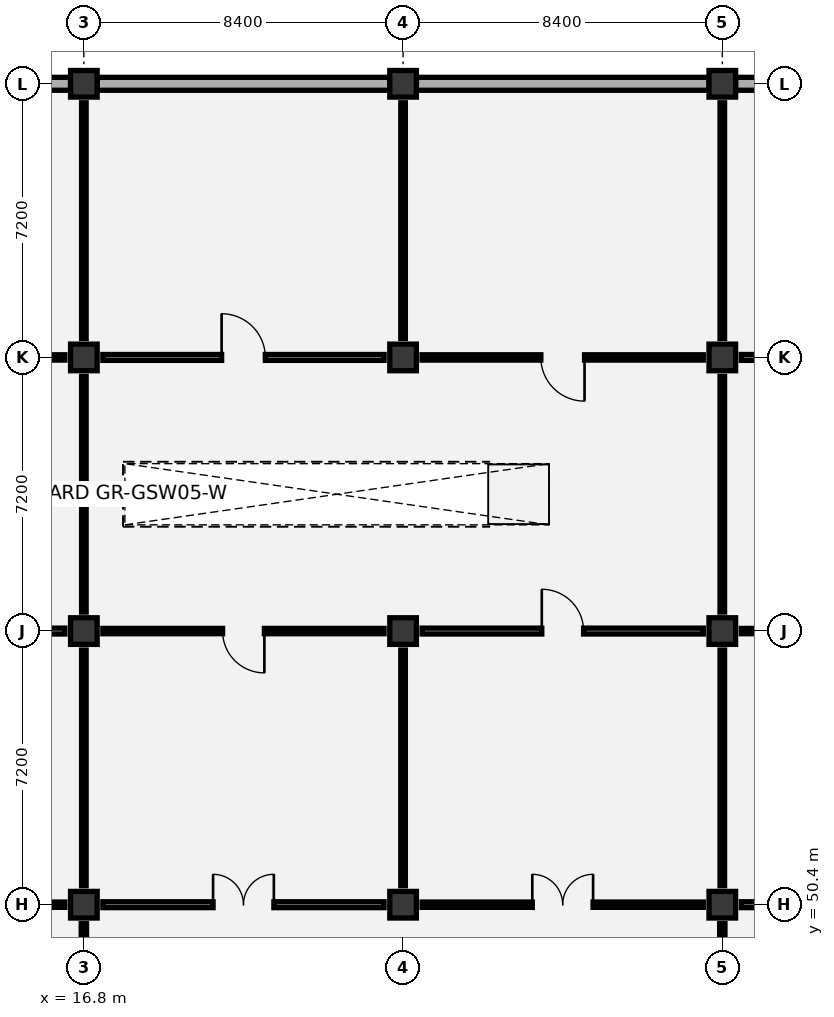
"""IFC4 building model, lengths in metres.
Left out: names, types, materials, properties, quantities, classifications, styles, units other than length and angle.
Written with IfcOpenShell. Run it as: python <this file> out.ifc"""

import sys

from ifc_helpers import new_model, si_unit, direction, frame, frame_2d, origin, origin_2d, place, context, subcontext, project, spatial, rectangle, extrude, element, fill, save


model = new_model("IFC4")
c1 = context("Model", 3, precision=1e-05, world=origin(), true_north=direction((0.0, 1.0)))
c2 = subcontext(c1, "Body", "Model", "MODEL_VIEW")
j1 = project(units=[si_unit("LENGTHUNIT", "METRE"), si_unit("PLANEANGLEUNIT", "RADIAN")], contexts=[c1])
p1 = place(None, origin())
s1 = spatial("IfcSite", under=j1, at=p1, CompositionType="ELEMENT")
p2 = place(p1, origin())
s2 = spatial("IfcBuilding", under=s1, at=p2, CompositionType="ELEMENT")
p3 = place(p2, origin())
s3 = spatial("IfcBuildingStorey", under=s2, at=p3, CompositionType="ELEMENT", Elevation=0.0)
for number, where, z_axis, x_axis in (
    (1, (16.8, 50.4, 0.0), (0.0, 0.0, 1.0), (1.0, 0.0, 0.0)),
    (2, (16.8, 57.6, 0.0), (0.0, 0.0, 1.0), (1.0, 0.0, 0.0)),
    (3, (16.8, 64.8, 0.0), (0.0, 0.0, 1.0), (1.0, 0.0, 0.0)),
    (4, (16.8, 72.0, 0.0), (0.0, 0.0, 1.0), (1.0, 0.0, 0.0)),
    (5, (25.2, 50.4, 0.0), (0.0, 0.0, 1.0), (1.0, 0.0, 0.0)),
    (6, (25.2, 57.6, 0.0), (0.0, 0.0, 1.0), (1.0, 0.0, 0.0)),
    (7, (25.2, 64.8, 0.0), (0.0, 0.0, 1.0), (1.0, 0.0, 0.0)),
    (8, (25.2, 72.0, 0.0), (0.0, 0.0, 1.0), (1.0, 0.0, 0.0)),
    (9, (33.6, 50.4, 0.0), (0.0, 0.0, 1.0), (1.0, 0.0, 0.0)),
    (10, (33.6, 57.6, 0.0), (0.0, 0.0, 1.0), (1.0, 0.0, 0.0)),
    (11, (33.6, 64.8, 0.0), (0.0, 0.0, 1.0), (1.0, 0.0, 0.0)),
    (12, (33.6, 72.0, 0.0), (0.0, 0.0, 1.0), (1.0, 0.0, 0.0)),
):
    element("IfcColumn", number, at=place(p3, frame(where, z_axis=z_axis, x_axis=x_axis)), inside=s3, PredefinedType="COLUMN", context=c2, shape_type="SweptSolid", body=[
        extrude(rectangle(XDim=0.7, YDim=0.7, at=origin_2d()), origin(), (0.0, 0.0, 1.0), 6.0),
    ])
p4 = place(p3, frame((8.75, 72.0, 0.0), z_axis=(0.0, 0.0, 1.0), x_axis=(1.0, 0.0, 0.0)))
e13 = element("IfcWall", 13, at=p4, inside=s3, PredefinedType="SOLIDWALL", context=c2, shape_type="SweptSolid", body=[
    extrude(rectangle(XDim=7.7, YDim=0.34, at=frame_2d((3.85, 0.0))), origin(), (0.0, 0.0, 1.0), 5.02),
])
p5 = place(p3, frame((17.15, 72.0, 0.0), z_axis=(0.0, 0.0, 1.0), x_axis=(1.0, 0.0, 0.0)))
e14 = element("IfcWall", 14, at=p5, inside=s3, PredefinedType="SOLIDWALL", context=c2, shape_type="SweptSolid", body=[
    extrude(rectangle(XDim=7.7, YDim=0.34, at=frame_2d((3.85, 0.0))), origin(), (0.0, 0.0, 1.0), 5.02),
])
for number, where, z_axis, x_axis in (
    (15, (25.55, 72.0, 0.0), (0.0, 0.0, 1.0), (1.0, 0.0, 0.0)),
    (16, (33.95, 72.0, 0.0), (0.0, 0.0, 1.0), (1.0, 0.0, 0.0)),
):
    element("IfcWall", number, at=place(p3, frame(where, z_axis=z_axis, x_axis=x_axis)), inside=s3, PredefinedType="SOLIDWALL", context=c2, shape_type="SweptSolid", body=[
        extrude(rectangle(XDim=7.7, YDim=0.34, at=frame_2d((3.85, 0.0))), origin(), (0.0, 0.0, 1.0), 5.02),
    ])
p6 = place(p3, frame((16.8, 43.7, 0.0), z_axis=(0.0, 0.0, 1.0), x_axis=(0.0, 1.0, 0.0)))
e17 = element("IfcWall", 17, at=p6, inside=s3, PredefinedType="PARTITIONING", context=c2, shape_type="SweptSolid", body=[
    extrude(rectangle(XDim=6.2, YDim=0.14, at=frame_2d((3.1, 0.0))), origin(), (0.0, 0.0, 1.0), 5.38),
])
p7 = place(p6, frame((2.3, 0.0, 0.0)))
e18 = element("IfcOpeningElement", 18, at=p7, cuts=e17, PredefinedType="OPENING", context=c2, shape_type="SweptSolid", body=[
    extrude(rectangle(XDim=1.6, YDim=2.2, at=frame_2d((0.8, 1.1))), frame((0.0, 0.08, 0.0), z_axis=(0.0, -1.0, 0.0), x_axis=(1.0, 0.0, 0.0)), (0.0, 0.0, 1.0), 0.16),
])
p8 = place(p3, frame((8.9, 50.4, 0.0), z_axis=(0.0, 0.0, 1.0), x_axis=(1.0, 0.0, 0.0)))
e19 = element("IfcWall", 19, at=p8, inside=s3, PredefinedType="PARTITIONING", context=c2, shape_type="SweptSolid", body=[
    extrude(rectangle(XDim=7.4, YDim=0.14, at=frame_2d((3.7, 0.0))), origin(), (0.0, 0.0, 1.0), 4.87),
])
p9 = place(p8, frame((2.8, 0.0, 0.0)))
e20 = element("IfcOpeningElement", 20, at=p9, cuts=e19, PredefinedType="OPENING", context=c2, shape_type="SweptSolid", body=[
    extrude(rectangle(XDim=1.8, YDim=2.25, at=frame_2d((0.9, 1.125))), frame((0.0, 0.08, 0.0), z_axis=(0.0, -1.0, 0.0), x_axis=(1.0, 0.0, 0.0)), (0.0, 0.0, 1.0), 0.16),
])
p10 = place(p3, frame((16.8, 50.9, 0.0), z_axis=(0.0, 0.0, 1.0), x_axis=(0.0, 1.0, 0.0)))
e21 = element("IfcWall", 21, at=p10, inside=s3, PredefinedType="PARTITIONING", context=c2, shape_type="SweptSolid", body=[
    extrude(rectangle(XDim=6.2, YDim=0.12, at=frame_2d((3.1, 0.0))), origin(), (0.0, 0.0, 1.0), 4.92),
])
p11 = place(p3, frame((8.9, 57.6, 0.0), z_axis=(0.0, 0.0, 1.0), x_axis=(1.0, 0.0, 0.0)))
e22 = element("IfcWall", 22, at=p11, inside=s3, PredefinedType="PARTITIONING", context=c2, shape_type="SweptSolid", body=[
    extrude(rectangle(XDim=7.4, YDim=0.155, at=frame_2d((3.7, 0.0))), origin(), (0.0, 0.0, 1.0), 4.87),
])
p12 = place(p11, frame((3.125, 0.0, 0.0)))
e23 = element("IfcOpeningElement", 23, at=p12, cuts=e22, PredefinedType="OPENING", context=c2, shape_type="SweptSolid", body=[
    extrude(rectangle(XDim=1.15, YDim=2.1, at=frame_2d((0.575, 1.05))), frame((0.0, 0.087, 0.0), z_axis=(0.0, -1.0, 0.0), x_axis=(1.0, 0.0, 0.0)), (0.0, 0.0, 1.0), 0.175),
])
p13 = place(p3, frame((16.8, 58.1, 0.0), z_axis=(0.0, 0.0, 1.0), x_axis=(0.0, 1.0, 0.0)))
e24 = element("IfcWall", 24, at=p13, inside=s3, PredefinedType="PARTITIONING", context=c2, shape_type="SweptSolid", body=[
    extrude(rectangle(XDim=6.2, YDim=0.12, at=frame_2d((3.1, 0.0))), origin(), (0.0, 0.0, 1.0), 5.17),
])
p14 = place(p3, frame((8.9, 64.8, 0.0), z_axis=(0.0, 0.0, 1.0), x_axis=(1.0, 0.0, 0.0)))
e25 = element("IfcWall", 25, at=p14, inside=s3, PredefinedType="PARTITIONING", context=c2, shape_type="SweptSolid", body=[
    extrude(rectangle(XDim=7.4, YDim=0.14, at=frame_2d((3.7, 0.0))), origin(), (0.0, 0.0, 1.0), 4.87),
])
p15 = place(p14, frame((3.15, 0.0, 0.0)))
e26 = element("IfcOpeningElement", 26, at=p15, cuts=e25, PredefinedType="OPENING", context=c2, shape_type="SweptSolid", body=[
    extrude(rectangle(XDim=1.1, YDim=2.1, at=frame_2d((0.55, 1.05))), frame((0.0, 0.08, 0.0), z_axis=(0.0, -1.0, 0.0), x_axis=(1.0, 0.0, 0.0)), (0.0, 0.0, 1.0), 0.16),
])
p16 = place(p3, frame((16.8, 65.3, 0.0), z_axis=(0.0, 0.0, 1.0), x_axis=(0.0, 1.0, 0.0)))
e27 = element("IfcWall", 27, at=p16, inside=s3, PredefinedType="PARTITIONING", context=c2, shape_type="SweptSolid", body=[
    extrude(rectangle(XDim=6.2, YDim=0.12, at=frame_2d((3.1, 0.0))), origin(), (0.0, 0.0, 1.0), 4.92),
])
p17 = place(p3, frame((17.3, 50.4, 0.0), z_axis=(0.0, 0.0, 1.0), x_axis=(1.0, 0.0, 0.0)))
e28 = element("IfcWall", 28, at=p17, inside=s3, PredefinedType="PARTITIONING", context=c2, shape_type="SweptSolid", body=[
    extrude(rectangle(XDim=7.4, YDim=0.155, at=frame_2d((3.7, 0.0))), origin(), (0.0, 0.0, 1.0), 4.87),
])
p18 = place(p17, frame((2.9, 0.0, 0.0)))
e29 = element("IfcOpeningElement", 29, at=p18, cuts=e28, PredefinedType="OPENING", context=c2, shape_type="SweptSolid", body=[
    extrude(rectangle(XDim=1.6, YDim=2.2, at=frame_2d((0.8, 1.1))), frame((0.0, 0.087, 0.0), z_axis=(0.0, -1.0, 0.0), x_axis=(1.0, 0.0, 0.0)), (0.0, 0.0, 1.0), 0.175),
])
p19 = place(p3, frame((25.2, 50.9, 0.0), z_axis=(0.0, 0.0, 1.0), x_axis=(0.0, 1.0, 0.0)))
e30 = element("IfcWall", 30, at=p19, inside=s3, PredefinedType="PARTITIONING", context=c2, shape_type="SweptSolid", body=[
    extrude(rectangle(XDim=6.2, YDim=0.12, at=frame_2d((3.1, 0.0))), origin(), (0.0, 0.0, 1.0), 5.17),
])
p20 = place(p3, frame((17.3, 57.6, 0.0), z_axis=(0.0, 0.0, 1.0), x_axis=(1.0, 0.0, 0.0)))
e31 = element("IfcWall", 31, at=p20, inside=s3, PredefinedType="PARTITIONING", context=c2, shape_type="SweptSolid", body=[
    extrude(rectangle(XDim=7.4, YDim=0.14, at=frame_2d((3.7, 0.0))), origin(), (0.0, 0.0, 1.0), 4.87),
])
p21 = place(p20, frame((3.15, 0.0, 0.0)))
e32 = element("IfcOpeningElement", 32, at=p21, cuts=e31, PredefinedType="OPENING", context=c2, shape_type="SweptSolid", body=[
    extrude(rectangle(XDim=1.1, YDim=2.1, at=frame_2d((0.55, 1.05))), frame((0.0, 0.08, 0.0), z_axis=(0.0, -1.0, 0.0), x_axis=(1.0, 0.0, 0.0)), (0.0, 0.0, 1.0), 0.16),
])
p22 = place(p3, frame((17.3, 64.8, 0.0), z_axis=(0.0, 0.0, 1.0), x_axis=(1.0, 0.0, 0.0)))
e33 = element("IfcWall", 33, at=p22, inside=s3, PredefinedType="PARTITIONING", context=c2, shape_type="SweptSolid", body=[
    extrude(rectangle(XDim=7.4, YDim=0.155, at=frame_2d((3.7, 0.0))), origin(), (0.0, 0.0, 1.0), 4.87),
])
p23 = place(p22, frame((3.125, 0.0, 0.0)))
e34 = element("IfcOpeningElement", 34, at=p23, cuts=e33, PredefinedType="OPENING", context=c2, shape_type="SweptSolid", body=[
    extrude(rectangle(XDim=1.15, YDim=2.1, at=frame_2d((0.575, 1.05))), frame((0.0, 0.087, 0.0), z_axis=(0.0, -1.0, 0.0), x_axis=(1.0, 0.0, 0.0)), (0.0, 0.0, 1.0), 0.175),
])
p24 = place(p3, frame((25.2, 65.3, 0.0), z_axis=(0.0, 0.0, 1.0), x_axis=(0.0, 1.0, 0.0)))
e35 = element("IfcWall", 35, at=p24, inside=s3, PredefinedType="PARTITIONING", context=c2, shape_type="SweptSolid", body=[
    extrude(rectangle(XDim=6.2, YDim=0.12, at=frame_2d((3.1, 0.0))), origin(), (0.0, 0.0, 1.0), 5.27),
])
p25 = place(p3, frame((33.6, 43.7, 0.0), z_axis=(0.0, 0.0, 1.0), x_axis=(0.0, 1.0, 0.0)))
e36 = element("IfcWall", 36, at=p25, inside=s3, PredefinedType="PARTITIONING", context=c2, shape_type="SweptSolid", body=[
    extrude(rectangle(XDim=6.2, YDim=0.14, at=frame_2d((3.1, 0.0))), origin(), (0.0, 0.0, 1.0), 5.17),
])
p26 = place(p25, frame((2.2, 0.0, 0.0)))
e37 = element("IfcOpeningElement", 37, at=p26, cuts=e36, PredefinedType="OPENING", context=c2, shape_type="SweptSolid", body=[
    extrude(rectangle(XDim=1.8, YDim=2.25, at=frame_2d((0.9, 1.125))), frame((0.0, 0.08, 0.0), z_axis=(0.0, -1.0, 0.0), x_axis=(1.0, 0.0, 0.0)), (0.0, 0.0, 1.0), 0.16),
])
p27 = place(p3, frame((25.7, 50.4, 0.0), z_axis=(0.0, 0.0, 1.0), x_axis=(1.0, 0.0, 0.0)))
e38 = element("IfcWall", 38, at=p27, inside=s3, PredefinedType="PARTITIONING", context=c2, shape_type="SweptSolid", body=[
    extrude(rectangle(XDim=7.4, YDim=0.14, at=frame_2d((3.7, 0.0))), origin(), (0.0, 0.0, 1.0), 4.87),
])
p28 = place(p27, frame((2.9, 0.0, 0.0)))
e39 = element("IfcOpeningElement", 39, at=p28, cuts=e38, PredefinedType="OPENING", context=c2, shape_type="SweptSolid", body=[
    extrude(rectangle(XDim=1.6, YDim=2.2, at=frame_2d((0.8, 1.1))), frame((0.0, 0.08, 0.0), z_axis=(0.0, -1.0, 0.0), x_axis=(1.0, 0.0, 0.0)), (0.0, 0.0, 1.0), 0.16),
])
p29 = place(p3, frame((33.6, 50.9, 0.0), z_axis=(0.0, 0.0, 1.0), x_axis=(0.0, 1.0, 0.0)))
e40 = element("IfcWall", 40, at=p29, inside=s3, PredefinedType="PARTITIONING", context=c2, shape_type="SweptSolid", body=[
    extrude(rectangle(XDim=6.2, YDim=0.12, at=frame_2d((3.1, 0.0))), origin(), (0.0, 0.0, 1.0), 4.92),
])
p30 = place(p3, frame((25.7, 57.6, 0.0), z_axis=(0.0, 0.0, 1.0), x_axis=(1.0, 0.0, 0.0)))
e41 = element("IfcWall", 41, at=p30, inside=s3, PredefinedType="PARTITIONING", context=c2, shape_type="SweptSolid", body=[
    extrude(rectangle(XDim=7.4, YDim=0.155, at=frame_2d((3.7, 0.0))), origin(), (0.0, 0.0, 1.0), 4.87),
])
p31 = place(p30, frame((3.15, 0.0, 0.0)))
e42 = element("IfcOpeningElement", 42, at=p31, cuts=e41, PredefinedType="OPENING", context=c2, shape_type="SweptSolid", body=[
    extrude(rectangle(XDim=1.1, YDim=2.1, at=frame_2d((0.55, 1.05))), frame((0.0, 0.087, 0.0), z_axis=(0.0, -1.0, 0.0), x_axis=(1.0, 0.0, 0.0)), (0.0, 0.0, 1.0), 0.175),
])
p32 = place(p3, frame((33.6, 58.1, 0.0), z_axis=(0.0, 0.0, 1.0), x_axis=(0.0, 1.0, 0.0)))
e43 = element("IfcWall", 43, at=p32, inside=s3, PredefinedType="PARTITIONING", context=c2, shape_type="SweptSolid", body=[
    extrude(rectangle(XDim=6.2, YDim=0.12, at=frame_2d((3.1, 0.0))), origin(), (0.0, 0.0, 1.0), 5.27),
])
p33 = place(p3, frame((25.7, 64.8, 0.0), z_axis=(0.0, 0.0, 1.0), x_axis=(1.0, 0.0, 0.0)))
e44 = element("IfcWall", 44, at=p33, inside=s3, PredefinedType="PARTITIONING", context=c2, shape_type="SweptSolid", body=[
    extrude(rectangle(XDim=7.4, YDim=0.14, at=frame_2d((3.7, 0.0))), origin(), (0.0, 0.0, 1.0), 4.87),
])
p34 = place(p33, frame((3.125, 0.0, 0.0)))
e45 = element("IfcOpeningElement", 45, at=p34, cuts=e44, PredefinedType="OPENING", context=c2, shape_type="SweptSolid", body=[
    extrude(rectangle(XDim=1.15, YDim=2.1, at=frame_2d((0.575, 1.05))), frame((0.0, 0.08, 0.0), z_axis=(0.0, -1.0, 0.0), x_axis=(1.0, 0.0, 0.0)), (0.0, 0.0, 1.0), 0.16),
])
p35 = place(p3, frame((33.6, 65.3, 0.0), z_axis=(0.0, 0.0, 1.0), x_axis=(0.0, 1.0, 0.0)))
e46 = element("IfcWall", 46, at=p35, inside=s3, PredefinedType="PARTITIONING", context=c2, shape_type="SweptSolid", body=[
    extrude(rectangle(XDim=6.2, YDim=0.12, at=frame_2d((3.1, 0.0))), origin(), (0.0, 0.0, 1.0), 4.92),
])
p36 = place(p3, frame((34.1, 50.4, 0.0), z_axis=(0.0, 0.0, 1.0), x_axis=(1.0, 0.0, 0.0)))
e47 = element("IfcWall", 47, at=p36, inside=s3, PredefinedType="PARTITIONING", context=c2, shape_type="SweptSolid", body=[
    extrude(rectangle(XDim=7.4, YDim=0.155, at=frame_2d((3.7, 0.0))), origin(), (0.0, 0.0, 1.0), 4.87),
])
p37 = place(p36, frame((2.9, 0.0, 0.0)))
e48 = element("IfcOpeningElement", 48, at=p37, cuts=e47, PredefinedType="OPENING", context=c2, shape_type="SweptSolid", body=[
    extrude(rectangle(XDim=1.6, YDim=2.2, at=frame_2d((0.8, 1.1))), frame((0.0, 0.087, 0.0), z_axis=(0.0, -1.0, 0.0), x_axis=(1.0, 0.0, 0.0)), (0.0, 0.0, 1.0), 0.175),
])
p38 = place(p3, frame((34.1, 57.6, 0.0), z_axis=(0.0, 0.0, 1.0), x_axis=(1.0, 0.0, 0.0)))
e49 = element("IfcWall", 49, at=p38, inside=s3, PredefinedType="PARTITIONING", context=c2, shape_type="SweptSolid", body=[
    extrude(rectangle(XDim=7.4, YDim=0.14, at=frame_2d((3.7, 0.0))), origin(), (0.0, 0.0, 1.0), 4.87),
])
p39 = place(p38, frame((3.15, 0.0, 0.0)))
e50 = element("IfcOpeningElement", 50, at=p39, cuts=e49, PredefinedType="OPENING", context=c2, shape_type="SweptSolid", body=[
    extrude(rectangle(XDim=1.1, YDim=2.1, at=frame_2d((0.55, 1.05))), frame((0.0, 0.08, 0.0), z_axis=(0.0, -1.0, 0.0), x_axis=(1.0, 0.0, 0.0)), (0.0, 0.0, 1.0), 0.16),
])
p40 = place(p3, frame((34.1, 64.8, 0.0), z_axis=(0.0, 0.0, 1.0), x_axis=(1.0, 0.0, 0.0)))
e51 = element("IfcWall", 51, at=p40, inside=s3, PredefinedType="PARTITIONING", context=c2, shape_type="SweptSolid", body=[
    extrude(rectangle(XDim=7.4, YDim=0.155, at=frame_2d((3.7, 0.0))), origin(), (0.0, 0.0, 1.0), 4.87),
])
p41 = place(p40, frame((3.125, 0.0, 0.0)))
e52 = element("IfcOpeningElement", 52, at=p41, cuts=e51, PredefinedType="OPENING", context=c2, shape_type="SweptSolid", body=[
    extrude(rectangle(XDim=1.15, YDim=2.1, at=frame_2d((0.575, 1.05))), frame((0.0, 0.087, 0.0), z_axis=(0.0, -1.0, 0.0), x_axis=(1.0, 0.0, 0.0)), (0.0, 0.0, 1.0), 0.175),
])
p42 = place(p18, origin())
e53 = element("IfcDoor", 53, at=p42, inside=s3, OperationType="DOUBLE_DOOR_SINGLE_SWING", PredefinedType="DOOR", context=c2, shape_type="SweptSolid", body=[
    extrude(rectangle(XDim=1.6, YDim=2.2, at=frame_2d((0.8, 1.1))), frame((0.0, 0.025, 0.0), z_axis=(0.0, -1.0, 0.0), x_axis=(1.0, 0.0, 0.0)), (0.0, 0.0, 1.0), 0.05),
])
fill(e29, e53)
p43 = place(p21, frame((1.1, 0.0, 0.0), z_axis=(0.0, 0.0, 1.0), x_axis=(-1.0, 0.0, 0.0)))
e54 = element("IfcDoor", 54, at=p43, inside=s3, OperationType="SINGLE_SWING_LEFT", PredefinedType="DOOR", context=c2, shape_type="SweptSolid", body=[
    extrude(rectangle(XDim=1.1, YDim=2.1, at=frame_2d((0.55, 1.05))), frame((0.0, 0.025, 0.0), z_axis=(0.0, -1.0, 0.0), x_axis=(1.0, 0.0, 0.0)), (0.0, 0.0, 1.0), 0.05),
])
fill(e32, e54)
p44 = place(p23, origin())
e55 = element("IfcDoor", 55, at=p44, inside=s3, OperationType="SINGLE_SWING_LEFT", PredefinedType="DOOR", context=c2, shape_type="SweptSolid", body=[
    extrude(rectangle(XDim=1.15, YDim=2.1, at=frame_2d((0.575, 1.05))), frame((0.0, 0.025, 0.0), z_axis=(0.0, -1.0, 0.0), x_axis=(1.0, 0.0, 0.0)), (0.0, 0.0, 1.0), 0.05),
])
fill(e34, e55)
p45 = place(p28, origin())
e56 = element("IfcDoor", 56, at=p45, inside=s3, OperationType="DOUBLE_DOOR_SINGLE_SWING", PredefinedType="DOOR", context=c2, shape_type="SweptSolid", body=[
    extrude(rectangle(XDim=1.6, YDim=2.2, at=frame_2d((0.8, 1.1))), frame((0.0, 0.025, 0.0), z_axis=(0.0, -1.0, 0.0), x_axis=(1.0, 0.0, 0.0)), (0.0, 0.0, 1.0), 0.05),
])
fill(e39, e56)
p46 = place(p31, origin())
e57 = element("IfcDoor", 57, at=p46, inside=s3, OperationType="SINGLE_SWING_LEFT", PredefinedType="DOOR", context=c2, shape_type="SweptSolid", body=[
    extrude(rectangle(XDim=1.1, YDim=2.1, at=frame_2d((0.55, 1.05))), frame((0.0, 0.025, 0.0), z_axis=(0.0, -1.0, 0.0), x_axis=(1.0, 0.0, 0.0)), (0.0, 0.0, 1.0), 0.05),
])
fill(e42, e57)
p47 = place(p34, frame((1.15, 0.0, 0.0), z_axis=(0.0, 0.0, 1.0), x_axis=(-1.0, 0.0, 0.0)))
e58 = element("IfcDoor", 58, at=p47, inside=s3, OperationType="SINGLE_SWING_LEFT", PredefinedType="DOOR", context=c2, shape_type="SweptSolid", body=[
    extrude(rectangle(XDim=1.15, YDim=2.1, at=frame_2d((0.575, 1.05))), frame((0.0, 0.025, 0.0), z_axis=(0.0, -1.0, 0.0), x_axis=(1.0, 0.0, 0.0)), (0.0, 0.0, 1.0), 0.05),
])
fill(e45, e58)
save(model, sys.argv[1])
